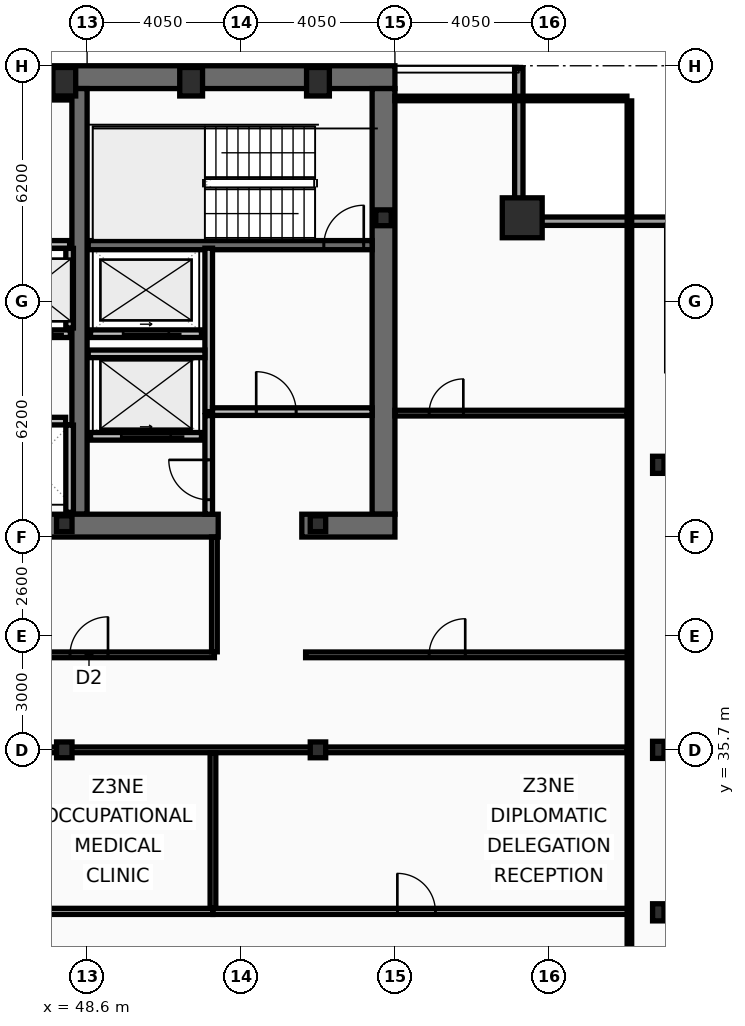
"""IFC4 building model, lengths in metres.
Left out: names, types, materials, properties, quantities, classifications, styles, units other than length and angle.
Written with IfcOpenShell. Run it as: python <this file> out.ifc"""

import sys

from ifc_helpers import new_model, si_unit, direction, frame, frame_2d, origin, origin_2d, place, context, subcontext, project, spatial, rectangle, hollow_rectangle, i_section, extrude, element, fill, save


model = new_model("IFC4")
c1 = context("Model", 3, precision=1e-05, world=origin(), true_north=direction((0.0, 1.0)))
c2 = subcontext(c1, "Body", "Model", "MODEL_VIEW")
j1 = project(units=[si_unit("LENGTHUNIT", "METRE"), si_unit("PLANEANGLEUNIT", "RADIAN")], contexts=[c1])
p1 = place(None, origin())
s1 = spatial("IfcSite", under=j1, at=p1, CompositionType="ELEMENT")
p2 = place(p1, origin())
s2 = spatial("IfcBuilding", under=s1, at=p2, CompositionType="ELEMENT")
p3 = place(p2, frame((0.0, 0.0, 249.8)))
s3 = spatial("IfcBuildingStorey", under=s2, at=p3, CompositionType="ELEMENT", Elevation=249.8)
p4 = place(p3, frame((16.2, 53.4, 0.0), z_axis=(0.0, 0.0, 1.0), x_axis=(1.0, 0.0, 0.0)))
e1 = element("IfcWall", 1, at=p4, inside=s3, PredefinedType="SHEAR", context=c2, shape_type="SweptSolid", body=[
    extrude(rectangle(XDim=40.5, YDim=0.6, at=frame_2d((20.25, 0.0))), origin(), (0.0, 0.0, 1.0), 3.44),
])
p5 = place(p3, frame((56.4, 53.1, 0.0), z_axis=(0.0, 0.0, 1.0), x_axis=(0.0, -1.0, 0.0)))
e2 = element("IfcWall", 2, at=p5, inside=s3, PredefinedType="SHEAR", context=c2, shape_type="SweptSolid", body=[
    extrude(rectangle(XDim=11.2, YDim=0.6, at=frame_2d((5.6, 0.0))), origin(), (0.0, 0.0, 1.0), 3.44),
])
p6 = place(p3, frame((48.4, 41.9, 0.0), z_axis=(0.0, 0.0, 1.0), x_axis=(0.0, 1.0, 0.0)))
e3 = element("IfcWall", 3, at=p6, inside=s3, PredefinedType="SHEAR", context=c2, shape_type="SweptSolid", body=[
    extrude(rectangle(XDim=11.2, YDim=0.4, at=frame_2d((5.6, 0.0))), origin(), (0.0, 0.0, 1.0), 3.44),
])
p7 = place(p3, frame((52.05, 41.6, 0.0), z_axis=(0.0, 0.0, 1.0), x_axis=(-1.0, 0.0, 0.0)))
e4 = element("IfcWall", 4, at=p7, inside=s3, PredefinedType="SHEAR", context=c2, shape_type="SweptSolid", body=[
    extrude(rectangle(XDim=11.3, YDim=0.6, at=frame_2d((5.65, 0.0))), origin(), (0.0, 0.0, 1.0), 3.44),
])
p8 = place(p3, frame((56.7, 41.6, 0.0), z_axis=(0.0, 0.0, 1.0), x_axis=(-1.0, 0.0, 0.0)))
e5 = element("IfcWall", 5, at=p8, inside=s3, PredefinedType="SHEAR", context=c2, shape_type="SweptSolid", body=[
    extrude(rectangle(XDim=2.45, YDim=0.6, at=frame_2d((1.225, 0.0))), origin(), (0.0, 0.0, 1.0), 3.44),
])
p9 = place(p3, frame((48.63, 48.98, 0.0), z_axis=(0.0, 0.0, 1.0), x_axis=(1.0, 0.0, 0.0)))
e6 = element("IfcWall", 6, at=p9, inside=s3, PredefinedType="SHEAR", context=c2, shape_type="SweptSolid", body=[
    extrude(rectangle(XDim=7.47, YDim=0.24, at=frame_2d((3.735, 0.0))), origin(), (0.0, 0.0, 1.0), 3.44),
])
p10 = place(p9, frame((6.2, 0.0, 0.0)))
e7 = element("IfcOpeningElement", 7, at=p10, cuts=e6, PredefinedType="OPENING", context=c2, shape_type="SweptSolid", body=[
    extrude(rectangle(XDim=1.05, YDim=2.15, at=frame_2d((0.525, 1.075))), frame((0.0, 0.13, 0.0), z_axis=(0.0, -1.0, 0.0), x_axis=(1.0, 0.0, 0.0)), (0.0, 0.0, 1.0), 0.26),
])
p11 = place(p3, frame((60.05, 49.7, 0.0), z_axis=(0.0, 0.0, 1.0), x_axis=(1.0, 0.0, 0.0)))
e8 = element("IfcColumn", 8, at=p11, inside=s3, PredefinedType="COLUMN", context=c2, shape_type="SweptSolid", body=[
    extrude(hollow_rectangle(XDim=1.05, YDim=1.05, WallThickness=0.055, at=origin_2d()), origin(), (0.0, 0.0, 1.0), 3.6),
])
for number, where, z_axis, x_axis in (
    (9, (48.0, 53.28, 0.0), (0.0, 0.0, 1.0), (1.0, 0.0, 0.0)),
    (10, (51.337, 53.28, 0.0), (0.0, 0.0, 1.0), (1.0, 0.0, 0.0)),
    (11, (54.675, 53.28, 0.0), (0.0, 0.0, 1.0), (1.0, 0.0, 0.0)),
):
    element("IfcColumn", number, at=place(p3, frame(where, z_axis=z_axis, x_axis=x_axis)), inside=s3, PredefinedType="COLUMN", context=c2, shape_type="SweptSolid", body=[
        extrude(hollow_rectangle(XDim=0.6, YDim=0.75, WallThickness=0.045, at=origin_2d()), origin(), (0.0, 0.0, 1.0), 3.6),
    ])
for number, where, z_axis, x_axis in (
    (12, (63.63, 31.425, 0.0), (0.0, 0.0, 1.0), (1.0, 0.0, 0.0)),
    (13, (63.63, 35.7, 0.0), (0.0, 0.0, 1.0), (1.0, 0.0, 0.0)),
    (14, (63.63, 43.2, 0.0), (0.0, 0.0, 1.0), (1.0, 0.0, 0.0)),
):
    element("IfcColumn", number, at=place(p3, frame(where, z_axis=z_axis, x_axis=x_axis)), inside=s3, PredefinedType="COLUMN", context=c2, shape_type="SweptSolid", body=[
        extrude(i_section(OverallWidth=0.3, OverallDepth=0.45, WebThickness=0.014, FlangeThickness=0.026, at=origin_2d()), origin(), (0.0, 0.0, 1.0), 3.6),
    ])
for number, where, z_axis, x_axis in (
    (15, (56.4, 49.7, 0.0), (0.0, 0.0, 1.0), (1.0, 0.0, 0.0)),
    (16, (48.0, 35.7, 0.0), (0.0, 0.0, 1.0), (1.0, 0.0, 0.0)),
    (17, (48.0, 41.65, 0.0), (0.0, 0.0, 1.0), (1.0, 0.0, 0.0)),
    (18, (54.675, 35.7, 0.0), (0.0, 0.0, 1.0), (1.0, 0.0, 0.0)),
    (19, (54.675, 41.65, 0.0), (0.0, 0.0, 1.0), (1.0, 0.0, 0.0)),
):
    element("IfcColumn", number, at=place(p3, frame(where, z_axis=z_axis, x_axis=x_axis)), inside=s3, PredefinedType="COLUMN", context=c2, shape_type="SweptSolid", body=[
        extrude(i_section(OverallWidth=0.406, OverallDepth=0.416, WebThickness=0.03, FlangeThickness=0.048, at=origin_2d()), origin(), (0.0, 0.0, 1.0), 3.6),
    ])
p12 = place(p3, frame((59.96, 53.63, 0.0), z_axis=(0.0, 0.0, 1.0), x_axis=(0.0, -1.0, 0.0)))
e20 = element("IfcWall", 20, at=p12, inside=s3, PredefinedType="SOLIDWALL", context=c2, shape_type="SweptSolid", body=[
    extrude(rectangle(XDim=3.91, YDim=0.22, at=frame_2d((1.955, 0.0))), origin(), (0.0, 0.0, 1.0), 2.83),
])
p13 = place(p3, frame((59.85, 49.61, 0.0), z_axis=(0.0, 0.0, 1.0), x_axis=(1.0, 0.0, 0.0)))
e21 = element("IfcWall", 21, at=p13, inside=s3, PredefinedType="SOLIDWALL", context=c2, shape_type="SweptSolid", body=[
    extrude(rectangle(XDim=4.22, YDim=0.22, at=frame_2d((2.11, 0.0))), origin(), (0.0, 0.0, 1.0), 2.83),
])
p14 = place(p3, frame((51.61, 43.95, 0.0), z_axis=(0.0, 0.0, 1.0), x_axis=(-1.0, 0.0, 0.0)))
e22 = element("IfcWall", 22, at=p14, inside=s3, PredefinedType="PARTITIONING", context=c2, shape_type="SweptSolid", body=[
    extrude(rectangle(XDim=2.92, YDim=0.2, at=frame_2d((1.46, 0.0))), origin(), (0.0, 0.0, 1.0), 3.44),
])
p15 = place(p14, frame((0.81, 0.0, 0.0)))
e23 = element("IfcOpeningElement", 23, at=p15, cuts=e22, PredefinedType="OPENING", context=c2, shape_type="SweptSolid", body=[
    extrude(rectangle(XDim=1.3, YDim=2.18, at=frame_2d((0.65, 1.09))), frame((0.0, 0.11, 0.0), z_axis=(0.0, -1.0, 0.0), x_axis=(1.0, 0.0, 0.0)), (0.0, 0.0, 1.0), 0.22),
])
p16 = place(p3, frame((51.61, 46.65, 0.0), z_axis=(0.0, 0.0, 1.0), x_axis=(-1.0, 0.0, 0.0)))
e24 = element("IfcWall", 24, at=p16, inside=s3, PredefinedType="PARTITIONING", context=c2, shape_type="SweptSolid", body=[
    extrude(rectangle(XDim=2.92, YDim=0.2, at=frame_2d((1.46, 0.0))), origin(), (0.0, 0.0, 1.0), 3.44),
])
p17 = place(p16, frame((0.86, 0.0, 0.0)))
e25 = element("IfcOpeningElement", 25, at=p17, cuts=e24, PredefinedType="OPENING", context=c2, shape_type="SweptSolid", body=[
    extrude(rectangle(XDim=1.2, YDim=2.18, at=frame_2d((0.6, 1.09))), frame((0.0, 0.11, 0.0), z_axis=(0.0, -1.0, 0.0), x_axis=(1.0, 0.0, 0.0)), (0.0, 0.0, 1.0), 0.22),
])
p18 = place(p3, frame((48.16, 46.65, 0.0), z_axis=(0.0, 0.0, 1.0), x_axis=(-1.0, 0.0, 0.0)))
e26 = element("IfcWall", 26, at=p18, inside=s3, PredefinedType="PARTITIONING", context=c2, shape_type="SweptSolid", body=[
    extrude(rectangle(XDim=6.48, YDim=0.2, at=frame_2d((3.24, 0.0))), origin(), (0.0, 0.0, 1.0), 3.44),
])
p19 = place(p18, frame((4.8, 0.0, 0.0)))
e27 = element("IfcOpeningElement", 27, at=p19, cuts=e26, PredefinedType="OPENING", context=c2, shape_type="SweptSolid", body=[
    extrude(rectangle(XDim=1.1, YDim=2.18, at=frame_2d((0.55, 1.09))), frame((0.0, 0.11, 0.0), z_axis=(0.0, -1.0, 0.0), x_axis=(1.0, 0.0, 0.0)), (0.0, 0.0, 1.0), 0.22),
])
p20 = place(p18, frame((2.64, 0.0, 0.0)))
e28 = element("IfcOpeningElement", 28, at=p20, cuts=e26, PredefinedType="OPENING", context=c2, shape_type="SweptSolid", body=[
    extrude(rectangle(XDim=1.1, YDim=2.18, at=frame_2d((0.55, 1.09))), frame((0.0, 0.11, 0.0), z_axis=(0.0, -1.0, 0.0), x_axis=(1.0, 0.0, 0.0)), (0.0, 0.0, 1.0), 0.22),
])
p21 = place(p18, frame((0.48, 0.0, 0.0)))
e29 = element("IfcOpeningElement", 29, at=p21, cuts=e26, PredefinedType="OPENING", context=c2, shape_type="SweptSolid", body=[
    extrude(rectangle(XDim=1.1, YDim=2.18, at=frame_2d((0.55, 1.09))), frame((0.0, 0.11, 0.0), z_axis=(0.0, -1.0, 0.0), x_axis=(1.0, 0.0, 0.0)), (0.0, 0.0, 1.0), 0.22),
])
p22 = place(p3, frame((51.8, 44.6, 0.0), z_axis=(0.0, 0.0, 1.0), x_axis=(0.0, 1.0, 0.0)))
e30 = element("IfcWall", 30, at=p22, inside=s3, PredefinedType="PARTITIONING", context=c2, shape_type="SweptSolid", body=[
    extrude(rectangle(XDim=4.3, YDim=0.2, at=frame_2d((2.15, 0.0))), origin(), (0.0, 0.0, 1.0), 3.44),
])
p23 = place(p3, frame((51.9, 44.6, 0.0), z_axis=(0.0, 0.0, 1.0), x_axis=(1.0, 0.0, 0.0)))
e31 = element("IfcWall", 31, at=p23, inside=s3, PredefinedType="PARTITIONING", context=c2, shape_type="SweptSolid", body=[
    extrude(rectangle(XDim=4.2, YDim=0.2, at=frame_2d((2.1, 0.0))), origin(), (0.0, 0.0, 1.0), 3.44),
])
p24 = place(p23, frame((1.15, 0.0, 0.0)))
e32 = element("IfcOpeningElement", 32, at=p24, cuts=e31, PredefinedType="OPENING", context=c2, shape_type="SweptSolid", body=[
    extrude(rectangle(XDim=1.05, YDim=2.15, at=frame_2d((0.525, 1.075))), frame((0.0, 0.11, 0.0), z_axis=(0.0, -1.0, 0.0), x_axis=(1.0, 0.0, 0.0)), (0.0, 0.0, 1.0), 0.22),
])
p25 = place(p3, frame((48.63, 46.12, 0.0), z_axis=(0.0, 0.0, 1.0), x_axis=(1.0, 0.0, 0.0)))
e33 = element("IfcWall", 33, at=p25, inside=s3, PredefinedType="PARTITIONING", context=c2, shape_type="SweptSolid", body=[
    extrude(rectangle(XDim=3.07, YDim=0.2, at=frame_2d((1.535, 0.0))), origin(), (0.0, 0.0, 1.0), 3.44),
])
p26 = place(p3, frame((51.8, 41.9, 0.0), z_axis=(0.0, 0.0, 1.0), x_axis=(0.0, 1.0, 0.0)))
e34 = element("IfcWall", 34, at=p26, inside=s3, PredefinedType="PARTITIONING", context=c2, shape_type="SweptSolid", body=[
    extrude(rectangle(XDim=2.595, YDim=0.2, at=frame_2d((1.298, 0.0))), origin(), (0.0, 0.0, 1.0), 3.44),
])
p27 = place(p26, frame((0.38, 0.0, 0.0)))
e35 = element("IfcOpeningElement", 35, at=p27, cuts=e34, PredefinedType="OPENING", context=c2, shape_type="SweptSolid", body=[
    extrude(rectangle(XDim=1.05, YDim=2.15, at=frame_2d((0.525, 1.075))), frame((0.0, 0.11, 0.0), z_axis=(0.0, -1.0, 0.0), x_axis=(1.0, 0.0, 0.0)), (0.0, 0.0, 1.0), 0.22),
])
p28 = place(p3, frame((48.14, 46.8, 0.0), z_axis=(0.0, 0.0, 1.0), x_axis=(0.0, 1.0, 0.0)))
e36 = element("IfcWall", 36, at=p28, inside=s3, PredefinedType="PARTITIONING", context=c2, shape_type="SweptSolid", body=[
    extrude(rectangle(XDim=2.095, YDim=0.2, at=frame_2d((1.047, 0.0))), origin(), (0.0, 0.0, 1.0), 3.44),
])
p29 = place(p3, frame((41.825, 44.35, 0.0), z_axis=(0.0, 0.0, 1.0), x_axis=(1.0, 0.0, 0.0)))
e37 = element("IfcWall", 37, at=p29, inside=s3, PredefinedType="PARTITIONING", context=c2, shape_type="SweptSolid", body=[
    extrude(rectangle(XDim=6.21, YDim=0.2, at=frame_2d((3.105, 0.0))), origin(), (0.0, 0.0, 1.0), 3.44),
])
p30 = place(p3, frame((48.14, 41.95, 0.0), z_axis=(0.0, 0.0, 1.0), x_axis=(0.0, 1.0, 0.0)))
e38 = element("IfcWall", 38, at=p30, inside=s3, PredefinedType="PARTITIONING", context=c2, shape_type="SweptSolid", body=[
    extrude(rectangle(XDim=2.295, YDim=0.2, at=frame_2d((1.147, 0.0))), origin(), (0.0, 0.0, 1.0), 3.44),
])
p31 = place(p3, frame((40.58, 52.86, 0.0), z_axis=(0.0, 0.0, 1.0), x_axis=(1.0, 0.0, 0.0)))
e39 = element("IfcWall", 39, at=p31, inside=s3, PredefinedType="PARTITIONING", context=c2, shape_type="SweptSolid", body=[
    extrude(rectangle(XDim=7.56, YDim=0.12, at=frame_2d((3.78, 0.0))), origin(), (0.0, 0.0, 1.0), 3.44),
])
p32 = place(p3, frame((40.58, 49.0, 0.0), z_axis=(0.0, 0.0, 1.0), x_axis=(1.0, 0.0, 0.0)))
e40 = element("IfcWall", 40, at=p32, inside=s3, PredefinedType="PARTITIONING", context=c2, shape_type="SweptSolid", body=[
    extrude(rectangle(XDim=7.56, YDim=0.2, at=frame_2d((3.78, 0.0))), origin(), (0.0, 0.0, 1.0), 3.44),
])
p33 = place(p32, frame((0.16, 0.0, 0.0)))
e41 = element("IfcOpeningElement", 41, at=p33, cuts=e40, PredefinedType="OPENING", context=c2, shape_type="SweptSolid", body=[
    extrude(rectangle(XDim=0.95, YDim=2.1, at=frame_2d((0.475, 1.05))), frame((0.0, 0.11, 0.0), z_axis=(0.0, -1.0, 0.0), x_axis=(1.0, 0.0, 0.0)), (0.0, 0.0, 1.0), 0.22),
])
p34 = place(p3, frame((47.05, 38.2, 0.0), z_axis=(0.0, 0.0, 1.0), x_axis=(1.0, 0.0, 0.0)))
e42 = element("IfcWall", 42, at=p34, inside=s3, PredefinedType="PARTITIONING", context=c2, shape_type="SweptSolid", body=[
    extrude(rectangle(XDim=4.9, YDim=0.15, at=frame_2d((2.45, 0.0))), origin(), (0.0, 0.0, 1.0), 2.78),
])
p35 = place(p34, frame((1.1, 0.0, 0.0)))
e43 = element("IfcOpeningElement", 43, at=p35, cuts=e42, PredefinedType="OPENING", context=c2, shape_type="SweptSolid", body=[
    extrude(rectangle(XDim=1.0, YDim=2.05, at=frame_2d((0.5, 1.025))), frame((0.0, 0.085, 0.0), z_axis=(0.0, -1.0, 0.0), x_axis=(1.0, 0.0, 0.0)), (0.0, 0.0, 1.0), 0.17),
])
p36 = place(p3, frame((51.95, 38.28, 0.0), z_axis=(0.0, 0.0, 1.0), x_axis=(0.0, 1.0, 0.0)))
e44 = element("IfcWall", 44, at=p36, inside=s3, PredefinedType="PARTITIONING", context=c2, shape_type="SweptSolid", body=[
    extrude(rectangle(XDim=3.02, YDim=0.15, at=frame_2d((1.51, 0.0))), origin(), (0.0, 0.0, 1.0), 3.44),
])
p37 = place(p3, frame((54.35, 38.2, 0.0), z_axis=(0.0, 0.0, 1.0), x_axis=(1.0, 0.0, 0.0)))
e45 = element("IfcWall", 45, at=p37, inside=s3, PredefinedType="PARTITIONING", context=c2, shape_type="SweptSolid", body=[
    extrude(rectangle(XDim=8.52, YDim=0.15, at=frame_2d((4.26, 0.0))), origin(), (0.0, 0.0, 1.0), 2.78),
])
p38 = place(p37, frame((3.25, 0.0, 0.0)))
e46 = element("IfcOpeningElement", 46, at=p38, cuts=e45, PredefinedType="OPENING", context=c2, shape_type="SweptSolid", body=[
    extrude(rectangle(XDim=0.95, YDim=2.05, at=frame_2d((0.475, 1.025))), frame((0.0, 0.085, 0.0), z_axis=(0.0, -1.0, 0.0), x_axis=(1.0, 0.0, 0.0)), (0.0, 0.0, 1.0), 0.17),
])
p39 = place(p3, frame((56.7, 44.56, 0.0), z_axis=(0.0, 0.0, 1.0), x_axis=(1.0, 0.0, 0.0)))
e47 = element("IfcWall", 47, at=p39, inside=s3, PredefinedType="PARTITIONING", context=c2, shape_type="SweptSolid", body=[
    extrude(rectangle(XDim=6.105, YDim=0.15, at=frame_2d((3.052, 0.0))), origin(), (0.0, 0.0, 1.0), 2.83),
])
p40 = place(p39, frame((0.9, 0.0, 0.0)))
e48 = element("IfcOpeningElement", 48, at=p40, cuts=e47, PredefinedType="OPENING", context=c2, shape_type="SweptSolid", body=[
    extrude(rectangle(XDim=0.9, YDim=2.05, at=frame_2d((0.45, 1.025))), frame((0.0, 0.085, 0.0), z_axis=(0.0, -1.0, 0.0), x_axis=(1.0, 0.0, 0.0)), (0.0, 0.0, 1.0), 0.17),
])
p41 = place(p3, frame((39.88, 35.7, 0.0), z_axis=(0.0, 0.0, 1.0), x_axis=(1.0, 0.0, 0.0)))
e49 = element("IfcWall", 49, at=p41, inside=s3, PredefinedType="PARTITIONING", context=c2, shape_type="SweptSolid", body=[
    extrude(rectangle(XDim=22.925, YDim=0.15, at=frame_2d((11.462, 0.0))), origin(), (0.0, 0.0, 1.0), 2.78),
])
p42 = place(p3, frame((39.8, 31.45, 0.0), z_axis=(0.0, 0.0, 1.0), x_axis=(1.0, 0.0, 0.0)))
e50 = element("IfcWall", 50, at=p42, inside=s3, PredefinedType="PARTITIONING", context=c2, shape_type="SweptSolid", body=[
    extrude(rectangle(XDim=12.112, YDim=0.16, at=frame_2d((6.056, 0.0))), origin(), (0.0, 0.0, 1.0), 2.78),
])
p43 = place(p42, frame((5.337, 0.0, 0.0)))
e51 = element("IfcOpeningElement", 51, at=p43, cuts=e50, PredefinedType="OPENING", context=c2, shape_type="SweptSolid", body=[
    extrude(rectangle(XDim=1.0, YDim=2.05, at=frame_2d((0.5, 1.025))), frame((0.0, 0.09, 0.0), z_axis=(0.0, -1.0, 0.0), x_axis=(1.0, 0.0, 0.0)), (0.0, 0.0, 1.0), 0.18),
])
p44 = place(p3, frame((51.912, 31.45, 0.0), z_axis=(0.0, 0.0, 1.0), x_axis=(1.0, 0.0, 0.0)))
e52 = element("IfcWall", 52, at=p44, inside=s3, PredefinedType="PARTITIONING", context=c2, shape_type="SweptSolid", body=[
    extrude(rectangle(XDim=10.958, YDim=0.16, at=frame_2d((5.479, 0.0))), origin(), (0.0, 0.0, 1.0), 2.78),
])
p45 = place(p44, frame((4.853, 0.0, 0.0)))
e53 = element("IfcOpeningElement", 53, at=p45, cuts=e52, PredefinedType="OPENING", context=c2, shape_type="SweptSolid", body=[
    extrude(rectangle(XDim=1.0, YDim=2.05, at=frame_2d((0.5, 1.025))), frame((0.0, 0.09, 0.0), z_axis=(0.0, -1.0, 0.0), x_axis=(1.0, 0.0, 0.0)), (0.0, 0.0, 1.0), 0.18),
])
p46 = place(p3, frame((51.912, 31.535, 0.0), z_axis=(0.0, 0.0, 1.0), x_axis=(0.0, 1.0, 0.0)))
e54 = element("IfcWall", 54, at=p46, inside=s3, PredefinedType="PARTITIONING", context=c2, shape_type="SweptSolid", body=[
    extrude(rectangle(XDim=4.085, YDim=0.15, at=frame_2d((2.042, 0.0))), origin(), (0.0, 0.0, 1.0), 3.03),
])
p47 = place(p3, frame((62.87, 10.665, 0.0), z_axis=(0.0, 0.0, 1.0), x_axis=(0.0, 1.0, 0.0)))
e55 = element("IfcWall", 55, at=p47, inside=s3, PredefinedType="PARTITIONING", context=c2, shape_type="SweptSolid", body=[
    extrude(rectangle(XDim=42.11, YDim=0.12, at=frame_2d((21.055, 0.0))), origin(), (0.0, 0.0, 1.0), 2.78),
])
p48 = place(p3, frame((56.7, 52.84, 0.0), z_axis=(0.0, 0.0, 1.0), x_axis=(1.0, 0.0, 0.0)))
e56 = element("IfcWall", 56, at=p48, inside=s3, PredefinedType="PARTITIONING", context=c2, shape_type="SweptSolid", body=[
    extrude(rectangle(XDim=6.105, YDim=0.12, at=frame_2d((3.052, 0.0))), origin(), (0.0, 0.0, 1.0), 3.44),
])
p49 = place(p10, origin())
e57 = element("IfcDoor", 57, at=p49, inside=s3, OperationType="SINGLE_SWING_RIGHT", PredefinedType="DOOR", context=c2, shape_type="SweptSolid", body=[
    extrude(rectangle(XDim=1.05, YDim=2.15, at=frame_2d((0.525, 1.075))), frame((0.0, 0.025, 0.0), z_axis=(0.0, -1.0, 0.0), x_axis=(1.0, 0.0, 0.0)), (0.0, 0.0, 1.0), 0.05),
])
fill(e7, e57)
p50 = place(p15, origin())
e58 = element("IfcDoor", 58, at=p50, inside=s3, OperationType="SLIDING_TO_LEFT", PredefinedType="DOOR", context=c2, shape_type="SweptSolid", body=[
    extrude(rectangle(XDim=1.3, YDim=2.18, at=frame_2d((0.65, 1.09))), frame((0.0, 0.025, 0.0), z_axis=(0.0, -1.0, 0.0), x_axis=(1.0, 0.0, 0.0)), (0.0, 0.0, 1.0), 0.05),
])
fill(e23, e58)
p51 = place(p17, origin())
e59 = element("IfcDoor", 59, at=p51, inside=s3, OperationType="SLIDING_TO_LEFT", PredefinedType="DOOR", context=c2, shape_type="SweptSolid", body=[
    extrude(rectangle(XDim=1.2, YDim=2.18, at=frame_2d((0.6, 1.09))), frame((0.0, 0.025, 0.0), z_axis=(0.0, -1.0, 0.0), x_axis=(1.0, 0.0, 0.0)), (0.0, 0.0, 1.0), 0.05),
])
fill(e25, e59)
p52 = place(p24, origin())
e60 = element("IfcDoor", 60, at=p52, inside=s3, OperationType="SINGLE_SWING_LEFT", PredefinedType="DOOR", context=c2, shape_type="SweptSolid", body=[
    extrude(rectangle(XDim=1.05, YDim=2.15, at=frame_2d((0.525, 1.075))), frame((0.0, 0.025, 0.0), z_axis=(0.0, -1.0, 0.0), x_axis=(1.0, 0.0, 0.0)), (0.0, 0.0, 1.0), 0.05),
])
fill(e32, e60)
p53 = place(p27, origin())
e61 = element("IfcDoor", 61, at=p53, inside=s3, OperationType="SINGLE_SWING_RIGHT", PredefinedType="DOOR", context=c2, shape_type="SweptSolid", body=[
    extrude(rectangle(XDim=1.05, YDim=2.15, at=frame_2d((0.525, 1.075))), frame((0.0, 0.025, 0.0), z_axis=(0.0, -1.0, 0.0), x_axis=(1.0, 0.0, 0.0)), (0.0, 0.0, 1.0), 0.05),
])
fill(e35, e61)
p54 = place(p35, origin())
e62 = element("IfcDoor", 62, at=p54, inside=s3, OperationType="SINGLE_SWING_RIGHT", PredefinedType="DOOR", context=c2, shape_type="SweptSolid", body=[
    extrude(rectangle(XDim=1.0, YDim=2.05, at=frame_2d((0.5, 1.025))), frame((0.0, 0.025, 0.0), z_axis=(0.0, -1.0, 0.0), x_axis=(1.0, 0.0, 0.0)), (0.0, 0.0, 1.0), 0.05),
])
fill(e43, e62)
p55 = place(p38, origin())
e63 = element("IfcDoor", 63, at=p55, inside=s3, OperationType="SINGLE_SWING_RIGHT", PredefinedType="DOOR", context=c2, shape_type="SweptSolid", body=[
    extrude(rectangle(XDim=0.95, YDim=2.05, at=frame_2d((0.475, 1.025))), frame((0.0, 0.025, 0.0), z_axis=(0.0, -1.0, 0.0), x_axis=(1.0, 0.0, 0.0)), (0.0, 0.0, 1.0), 0.05),
])
fill(e46, e63)
p56 = place(p40, origin())
e64 = element("IfcDoor", 64, at=p56, inside=s3, OperationType="SINGLE_SWING_RIGHT", PredefinedType="DOOR", context=c2, shape_type="SweptSolid", body=[
    extrude(rectangle(XDim=0.9, YDim=2.05, at=frame_2d((0.45, 1.025))), frame((0.0, 0.025, 0.0), z_axis=(0.0, -1.0, 0.0), x_axis=(1.0, 0.0, 0.0)), (0.0, 0.0, 1.0), 0.05),
])
fill(e48, e64)
p57 = place(p45, origin())
e65 = element("IfcDoor", 65, at=p57, inside=s3, OperationType="SINGLE_SWING_LEFT", PredefinedType="DOOR", context=c2, shape_type="SweptSolid", body=[
    extrude(rectangle(XDim=1.0, YDim=2.05, at=frame_2d((0.5, 1.025))), frame((0.0, 0.025, 0.0), z_axis=(0.0, -1.0, 0.0), x_axis=(1.0, 0.0, 0.0)), (0.0, 0.0, 1.0), 0.05),
])
fill(e53, e65)
save(model, sys.argv[1])
